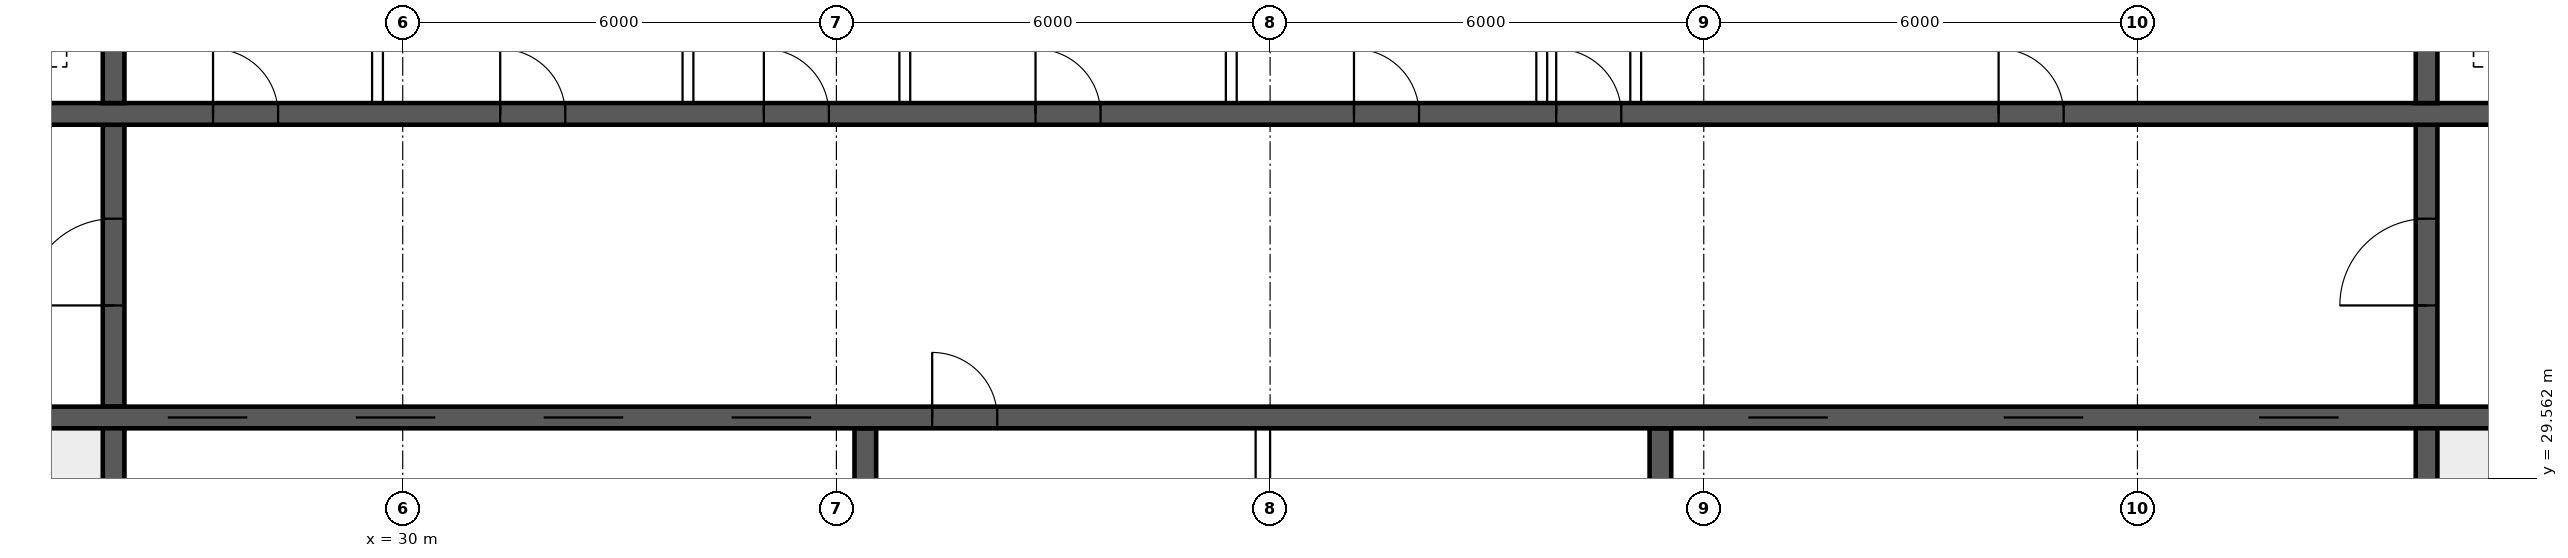
"""IFC4 building model, lengths in metres.
Left out: names, types, materials, properties, quantities, classifications, styles, units other than length and angle.
Written with IfcOpenShell. Run it as: python <this file> out.ifc"""

import sys

from ifc_helpers import new_model, si_unit, direction, frame, frame_2d, origin, place, context, subcontext, project, spatial, rectangle, extrude, element, fill, save


model = new_model("IFC4")
c1 = context("Model", 3, precision=1e-05, world=origin(), true_north=direction((0.0, 1.0)))
c2 = subcontext(c1, "Body", "Model", "MODEL_VIEW")
j1 = project(units=[si_unit("LENGTHUNIT", "METRE"), si_unit("PLANEANGLEUNIT", "RADIAN")], contexts=[c1])
p1 = place(None, origin())
s1 = spatial("IfcSite", under=j1, at=p1, CompositionType="ELEMENT")
p2 = place(p1, origin())
s2 = spatial("IfcBuilding", under=s1, at=p2, CompositionType="ELEMENT")
p3 = place(p2, frame((0.0, 0.0, 182.35)))
s3 = spatial("IfcBuildingStorey", under=s2, at=p3, CompositionType="ELEMENT", Elevation=182.35)
p4 = place(p3, frame((18.425, 30.4, 0.0), z_axis=(0.0, 0.0, 1.0), x_axis=(1.0, 0.0, 0.0)))
e1 = element("IfcWall", 1, at=p4, inside=s3, PredefinedType="SHEAR", context=c2, shape_type="SweptSolid", body=[
    extrude(rectangle(XDim=47.15, YDim=0.3, at=frame_2d((23.575, 0.0))), origin(), (0.0, 0.0, 1.0), 3.75),
])
p5 = place(p4, frame((0.4, 0.0, 0.0)))
e2 = element("IfcOpeningElement", 2, at=p5, cuts=e1, PredefinedType="OPENING", context=c2, shape_type="SweptSolid", body=[
    extrude(rectangle(XDim=1.0, YDim=2.1, at=frame_2d((0.5, 1.05))), frame((0.0, 0.16, 0.0), z_axis=(0.0, -1.0, 0.0), x_axis=(1.0, 0.0, 0.0)), (0.0, 0.0, 1.0), 0.32),
])
p6 = place(p4, frame((45.75, 0.0, 0.0)))
e3 = element("IfcOpeningElement", 3, at=p6, cuts=e1, PredefinedType="OPENING", context=c2, shape_type="SweptSolid", body=[
    extrude(rectangle(XDim=1.0, YDim=2.1, at=frame_2d((0.5, 1.05))), frame((0.0, 0.16, 0.0), z_axis=(0.0, -1.0, 0.0), x_axis=(1.0, 0.0, 0.0)), (0.0, 0.0, 1.0), 0.32),
])
p7 = place(p4, frame((8.325, 0.0, 0.0)))
e4 = element("IfcOpeningElement", 4, at=p7, cuts=e1, PredefinedType="OPENING", context=c2, shape_type="SweptSolid", body=[
    extrude(rectangle(XDim=1.1, YDim=2.1, at=frame_2d((0.55, 1.05))), frame((0.0, 0.16, 0.0), z_axis=(0.0, -1.0, 0.0), x_axis=(1.0, 0.0, 0.0)), (0.0, 0.0, 1.0), 0.32),
])
p8 = place(p4, frame((10.925, 0.0, 0.0)))
e5 = element("IfcOpeningElement", 5, at=p8, cuts=e1, PredefinedType="OPENING", context=c2, shape_type="SweptSolid", body=[
    extrude(rectangle(XDim=1.1, YDim=2.1, at=frame_2d((0.55, 1.05))), frame((0.0, 0.16, 0.0), z_axis=(0.0, -1.0, 0.0), x_axis=(1.0, 0.0, 0.0)), (0.0, 0.0, 1.0), 0.32),
])
p9 = place(p4, frame((13.525, 0.0, 0.0)))
e6 = element("IfcOpeningElement", 6, at=p9, cuts=e1, PredefinedType="OPENING", context=c2, shape_type="SweptSolid", body=[
    extrude(rectangle(XDim=1.1, YDim=2.1, at=frame_2d((0.55, 1.05))), frame((0.0, 0.16, 0.0), z_axis=(0.0, -1.0, 0.0), x_axis=(1.0, 0.0, 0.0)), (0.0, 0.0, 1.0), 0.32),
])
p10 = place(p4, frame((16.125, 0.0, 0.0)))
e7 = element("IfcOpeningElement", 7, at=p10, cuts=e1, PredefinedType="OPENING", context=c2, shape_type="SweptSolid", body=[
    extrude(rectangle(XDim=1.1, YDim=2.1, at=frame_2d((0.55, 1.05))), frame((0.0, 0.16, 0.0), z_axis=(0.0, -1.0, 0.0), x_axis=(1.0, 0.0, 0.0)), (0.0, 0.0, 1.0), 0.32),
])
p11 = place(p4, frame((18.9, 0.0, 0.0)))
e8 = element("IfcOpeningElement", 8, at=p11, cuts=e1, PredefinedType="OPENING", context=c2, shape_type="SweptSolid", body=[
    extrude(rectangle(XDim=0.9, YDim=2.1, at=frame_2d((0.45, 1.05))), frame((0.0, 0.16, 0.0), z_axis=(0.0, -1.0, 0.0), x_axis=(1.0, 0.0, 0.0)), (0.0, 0.0, 1.0), 0.32),
])
p12 = place(p4, frame((30.192, 0.0, 0.0)))
e9 = element("IfcOpeningElement", 9, at=p12, cuts=e1, PredefinedType="OPENING", context=c2, shape_type="SweptSolid", body=[
    extrude(rectangle(XDim=1.1, YDim=2.1, at=frame_2d((0.55, 1.05))), frame((0.0, 0.16, 0.0), z_axis=(0.0, -1.0, 0.0), x_axis=(1.0, 0.0, 0.0)), (0.0, 0.0, 1.0), 0.32),
])
p13 = place(p4, frame((33.725, 0.0, 0.0)))
e10 = element("IfcOpeningElement", 10, at=p13, cuts=e1, PredefinedType="OPENING", context=c2, shape_type="SweptSolid", body=[
    extrude(rectangle(XDim=1.1, YDim=2.1, at=frame_2d((0.55, 1.05))), frame((0.0, 0.16, 0.0), z_axis=(0.0, -1.0, 0.0), x_axis=(1.0, 0.0, 0.0)), (0.0, 0.0, 1.0), 0.32),
])
p14 = place(p4, frame((37.258, 0.0, 0.0)))
e11 = element("IfcOpeningElement", 11, at=p14, cuts=e1, PredefinedType="OPENING", context=c2, shape_type="SweptSolid", body=[
    extrude(rectangle(XDim=1.1, YDim=2.1, at=frame_2d((0.55, 1.05))), frame((0.0, 0.16, 0.0), z_axis=(0.0, -1.0, 0.0), x_axis=(1.0, 0.0, 0.0)), (0.0, 0.0, 1.0), 0.32),
])
p15 = place(p3, frame((18.425, 34.6, 0.0), z_axis=(0.0, 0.0, 1.0), x_axis=(1.0, 0.0, 0.0)))
e12 = element("IfcWall", 12, at=p15, inside=s3, PredefinedType="SHEAR", context=c2, shape_type="SweptSolid", body=[
    extrude(rectangle(XDim=47.15, YDim=0.3, at=frame_2d((23.575, 0.0))), origin(), (0.0, 0.0, 1.0), 3.75),
])
p16 = place(p15, frame((0.9, 0.0, 0.0)))
e13 = element("IfcOpeningElement", 13, at=p16, cuts=e12, PredefinedType="OPENING", context=c2, shape_type="SweptSolid", body=[
    extrude(rectangle(XDim=1.1, YDim=2.1, at=frame_2d((0.55, 1.05))), frame((0.0, 0.16, 0.0), z_axis=(0.0, -1.0, 0.0), x_axis=(1.0, 0.0, 0.0)), (0.0, 0.0, 1.0), 0.32),
])
p17 = place(p15, frame((45.15, 0.0, 0.0)))
e14 = element("IfcOpeningElement", 14, at=p17, cuts=e12, PredefinedType="OPENING", context=c2, shape_type="SweptSolid", body=[
    extrude(rectangle(XDim=1.1, YDim=2.1, at=frame_2d((0.55, 1.05))), frame((0.0, 0.16, 0.0), z_axis=(0.0, -1.0, 0.0), x_axis=(1.0, 0.0, 0.0)), (0.0, 0.0, 1.0), 0.32),
])
p18 = place(p15, frame((4.175, 0.0, 0.0)))
e15 = element("IfcOpeningElement", 15, at=p18, cuts=e12, PredefinedType="OPENING", context=c2, shape_type="SweptSolid", body=[
    extrude(rectangle(XDim=0.9, YDim=2.1, at=frame_2d((0.45, 1.05))), frame((0.0, 0.16, 0.0), z_axis=(0.0, -1.0, 0.0), x_axis=(1.0, 0.0, 0.0)), (0.0, 0.0, 1.0), 0.32),
])
p19 = place(p15, frame((42.075, 0.0, 0.0)))
e16 = element("IfcOpeningElement", 16, at=p19, cuts=e12, PredefinedType="OPENING", context=c2, shape_type="SweptSolid", body=[
    extrude(rectangle(XDim=0.9, YDim=2.1, at=frame_2d((0.45, 1.05))), frame((0.0, 0.16, 0.0), z_axis=(0.0, -1.0, 0.0), x_axis=(1.0, 0.0, 0.0)), (0.0, 0.0, 1.0), 0.32),
])
p20 = place(p15, frame((8.95, 0.0, 0.0)))
e17 = element("IfcOpeningElement", 17, at=p20, cuts=e12, PredefinedType="OPENING", context=c2, shape_type="SweptSolid", body=[
    extrude(rectangle(XDim=0.9, YDim=2.1, at=frame_2d((0.45, 1.05))), frame((0.0, 0.16, 0.0), z_axis=(0.0, -1.0, 0.0), x_axis=(1.0, 0.0, 0.0)), (0.0, 0.0, 1.0), 0.32),
])
p21 = place(p15, frame((12.924, 0.0, 0.0)))
e18 = element("IfcOpeningElement", 18, at=p21, cuts=e12, PredefinedType="OPENING", context=c2, shape_type="SweptSolid", body=[
    extrude(rectangle(XDim=0.9, YDim=2.1, at=frame_2d((0.45, 1.05))), frame((0.0, 0.16, 0.0), z_axis=(0.0, -1.0, 0.0), x_axis=(1.0, 0.0, 0.0)), (0.0, 0.0, 1.0), 0.32),
])
p22 = place(p15, frame((16.571, 0.0, 0.0)))
e19 = element("IfcOpeningElement", 19, at=p22, cuts=e12, PredefinedType="OPENING", context=c2, shape_type="SweptSolid", body=[
    extrude(rectangle(XDim=0.9, YDim=2.1, at=frame_2d((0.45, 1.05))), frame((0.0, 0.16, 0.0), z_axis=(0.0, -1.0, 0.0), x_axis=(1.0, 0.0, 0.0)), (0.0, 0.0, 1.0), 0.32),
])
p23 = place(p15, frame((20.33, 0.0, 0.0)))
e20 = element("IfcOpeningElement", 20, at=p23, cuts=e12, PredefinedType="OPENING", context=c2, shape_type="SweptSolid", body=[
    extrude(rectangle(XDim=0.9, YDim=2.1, at=frame_2d((0.45, 1.05))), frame((0.0, 0.16, 0.0), z_axis=(0.0, -1.0, 0.0), x_axis=(1.0, 0.0, 0.0)), (0.0, 0.0, 1.0), 0.32),
])
p24 = place(p15, frame((24.736, 0.0, 0.0)))
e21 = element("IfcOpeningElement", 21, at=p24, cuts=e12, PredefinedType="OPENING", context=c2, shape_type="SweptSolid", body=[
    extrude(rectangle(XDim=0.9, YDim=2.1, at=frame_2d((0.45, 1.05))), frame((0.0, 0.16, 0.0), z_axis=(0.0, -1.0, 0.0), x_axis=(1.0, 0.0, 0.0)), (0.0, 0.0, 1.0), 0.32),
])
p25 = place(p15, frame((27.533, 0.0, 0.0)))
e22 = element("IfcOpeningElement", 22, at=p25, cuts=e12, PredefinedType="OPENING", context=c2, shape_type="SweptSolid", body=[
    extrude(rectangle(XDim=0.9, YDim=2.1, at=frame_2d((0.45, 1.05))), frame((0.0, 0.16, 0.0), z_axis=(0.0, -1.0, 0.0), x_axis=(1.0, 0.0, 0.0)), (0.0, 0.0, 1.0), 0.32),
])
p26 = place(p15, frame((33.654, 0.0, 0.0)))
e23 = element("IfcOpeningElement", 23, at=p26, cuts=e12, PredefinedType="OPENING", context=c2, shape_type="SweptSolid", body=[
    extrude(rectangle(XDim=0.9, YDim=2.1, at=frame_2d((0.45, 1.05))), frame((0.0, 0.16, 0.0), z_axis=(0.0, -1.0, 0.0), x_axis=(1.0, 0.0, 0.0)), (0.0, 0.0, 1.0), 0.32),
])
for number, where, z_axis, x_axis in (
    (24, (26.0, 26.225, 0.0), (0.0, 0.0, 1.0), (0.0, 1.0, 0.0)),
    (25, (58.0, 26.225, 0.0), (0.0, 0.0, 1.0), (0.0, 1.0, 0.0)),
):
    element("IfcWall", number, at=place(p3, frame(where, z_axis=z_axis, x_axis=x_axis)), inside=s3, PredefinedType="SHEAR", context=c2, shape_type="SweptSolid", body=[
        extrude(rectangle(XDim=4.025, YDim=0.3, at=frame_2d((2.012, 0.0))), origin(), (0.0, 0.0, 1.0), 3.75),
    ])
p27 = place(p3, frame((26.0, 30.55, 0.0), z_axis=(0.0, 0.0, 1.0), x_axis=(0.0, 1.0, 0.0)))
e26 = element("IfcWall", 26, at=p27, inside=s3, PredefinedType="SHEAR", context=c2, shape_type="SweptSolid", body=[
    extrude(rectangle(XDim=3.9, YDim=0.3, at=frame_2d((1.95, 0.0))), origin(), (0.0, 0.0, 1.0), 3.75),
])
p28 = place(p27, frame((1.4, 0.0, 0.0)))
e27 = element("IfcOpeningElement", 27, at=p28, cuts=e26, PredefinedType="OPENING", context=c2, shape_type="SweptSolid", body=[
    extrude(rectangle(XDim=1.2, YDim=2.1, at=frame_2d((0.6, 1.05))), frame((0.0, 0.16, 0.0), z_axis=(0.0, -1.0, 0.0), x_axis=(1.0, 0.0, 0.0)), (0.0, 0.0, 1.0), 0.32),
])
p29 = place(p3, frame((58.0, 30.55, 0.0), z_axis=(0.0, 0.0, 1.0), x_axis=(0.0, 1.0, 0.0)))
e28 = element("IfcWall", 28, at=p29, inside=s3, PredefinedType="SHEAR", context=c2, shape_type="SweptSolid", body=[
    extrude(rectangle(XDim=3.9, YDim=0.3, at=frame_2d((1.95, 0.0))), origin(), (0.0, 0.0, 1.0), 3.75),
])
p30 = place(p29, frame((1.4, 0.0, 0.0)))
e29 = element("IfcOpeningElement", 29, at=p30, cuts=e28, PredefinedType="OPENING", context=c2, shape_type="SweptSolid", body=[
    extrude(rectangle(XDim=1.2, YDim=2.1, at=frame_2d((0.6, 1.05))), frame((0.0, 0.16, 0.0), z_axis=(0.0, -1.0, 0.0), x_axis=(1.0, 0.0, 0.0)), (0.0, 0.0, 1.0), 0.32),
])
for number, where, z_axis, x_axis in (
    (30, (26.0, 34.75, 0.0), (0.0, 0.0, 1.0), (0.0, 1.0, 0.0)),
    (31, (58.0, 34.75, 0.0), (0.0, 0.0, 1.0), (0.0, 1.0, 0.0)),
):
    element("IfcWall", number, at=place(p3, frame(where, z_axis=z_axis, x_axis=x_axis)), inside=s3, PredefinedType="SHEAR", context=c2, shape_type="SweptSolid", body=[
        extrude(rectangle(XDim=3.025, YDim=0.3, at=frame_2d((1.512, 0.0))), origin(), (0.0, 0.0, 1.0), 3.75),
    ])
for number, where, z_axis, x_axis in (
    (32, (36.4, 26.225, 0.0), (0.0, 0.0, 1.0), (0.0, 1.0, 0.0)),
    (33, (47.4, 26.225, 0.0), (0.0, 0.0, 1.0), (0.0, 1.0, 0.0)),
):
    element("IfcWall", number, at=place(p3, frame(where, z_axis=z_axis, x_axis=x_axis)), inside=s3, PredefinedType="SHEAR", context=c2, shape_type="SweptSolid", body=[
        extrude(rectangle(XDim=4.025, YDim=0.3, at=frame_2d((2.012, 0.0))), origin(), (0.0, 0.0, 1.0), 3.75),
    ])
for number, where, z_axis, x_axis in (
    (34, (29.651, 34.75, 0.0), (0.0, 0.0, 1.0), (0.0, 1.0, 0.0)),
    (35, (33.946, 34.75, 0.0), (0.0, 0.0, 1.0), (0.0, 1.0, 0.0)),
    (36, (36.946, 34.75, 0.0), (0.0, 0.0, 1.0), (0.0, 1.0, 0.0)),
    (37, (41.463, 34.75, 0.0), (0.0, 0.0, 1.0), (0.0, 1.0, 0.0)),
    (38, (45.758, 34.75, 0.0), (0.0, 0.0, 1.0), (0.0, 1.0, 0.0)),
    (39, (47.058, 34.75, 0.0), (0.0, 0.0, 1.0), (0.0, 1.0, 0.0)),
):
    element("IfcWall", number, at=place(p3, frame(where, z_axis=z_axis, x_axis=x_axis)), inside=s3, PredefinedType="SOLIDWALL", context=c2, shape_type="SweptSolid", body=[
        extrude(rectangle(XDim=3.025, YDim=0.15, at=frame_2d((1.512, 0.0))), origin(), (0.0, 0.0, 1.0), 3.5),
    ])
p31 = place(p3, frame((41.9, 26.225, 0.0), z_axis=(0.0, 0.0, 1.0), x_axis=(0.0, 1.0, 0.0)))
e40 = element("IfcWall", 40, at=p31, inside=s3, PredefinedType="SOLIDWALL", context=c2, shape_type="SweptSolid", body=[
    extrude(rectangle(XDim=4.025, YDim=0.2, at=frame_2d((2.012, 0.0))), origin(), (0.0, 0.0, 1.0), 3.5),
])
p32 = place(p28, origin())
e41 = element("IfcDoor", 41, at=p32, inside=s3, OperationType="SINGLE_SWING_LEFT", PredefinedType="DOOR", context=c2, shape_type="SweptSolid", body=[
    extrude(rectangle(XDim=1.2, YDim=2.1, at=frame_2d((0.6, 1.05))), frame((0.0, 0.025, 0.0), z_axis=(0.0, -1.0, 0.0), x_axis=(1.0, 0.0, 0.0)), (0.0, 0.0, 1.0), 0.05),
])
fill(e27, e41)
p33 = place(p30, origin())
e42 = element("IfcDoor", 42, at=p33, inside=s3, OperationType="SINGLE_SWING_LEFT", PredefinedType="DOOR", context=c2, shape_type="SweptSolid", body=[
    extrude(rectangle(XDim=1.2, YDim=2.1, at=frame_2d((0.6, 1.05))), frame((0.0, 0.025, 0.0), z_axis=(0.0, -1.0, 0.0), x_axis=(1.0, 0.0, 0.0)), (0.0, 0.0, 1.0), 0.05),
])
fill(e29, e42)
p34 = place(p20, origin())
e43 = element("IfcDoor", 43, at=p34, inside=s3, OperationType="SINGLE_SWING_LEFT", PredefinedType="DOOR", context=c2, shape_type="SweptSolid", body=[
    extrude(rectangle(XDim=0.9, YDim=2.1, at=frame_2d((0.45, 1.05))), frame((0.0, 0.025, 0.0), z_axis=(0.0, -1.0, 0.0), x_axis=(1.0, 0.0, 0.0)), (0.0, 0.0, 1.0), 0.05),
])
fill(e17, e43)
p35 = place(p21, origin())
e44 = element("IfcDoor", 44, at=p35, inside=s3, OperationType="SINGLE_SWING_LEFT", PredefinedType="DOOR", context=c2, shape_type="SweptSolid", body=[
    extrude(rectangle(XDim=0.9, YDim=2.1, at=frame_2d((0.45, 1.05))), frame((0.0, 0.025, 0.0), z_axis=(0.0, -1.0, 0.0), x_axis=(1.0, 0.0, 0.0)), (0.0, 0.0, 1.0), 0.05),
])
fill(e18, e44)
p36 = place(p22, origin())
e45 = element("IfcDoor", 45, at=p36, inside=s3, OperationType="SINGLE_SWING_LEFT", PredefinedType="DOOR", context=c2, shape_type="SweptSolid", body=[
    extrude(rectangle(XDim=0.9, YDim=2.1, at=frame_2d((0.45, 1.05))), frame((0.0, 0.025, 0.0), z_axis=(0.0, -1.0, 0.0), x_axis=(1.0, 0.0, 0.0)), (0.0, 0.0, 1.0), 0.05),
])
fill(e19, e45)
p37 = place(p23, origin())
e46 = element("IfcDoor", 46, at=p37, inside=s3, OperationType="SINGLE_SWING_LEFT", PredefinedType="DOOR", context=c2, shape_type="SweptSolid", body=[
    extrude(rectangle(XDim=0.9, YDim=2.1, at=frame_2d((0.45, 1.05))), frame((0.0, 0.025, 0.0), z_axis=(0.0, -1.0, 0.0), x_axis=(1.0, 0.0, 0.0)), (0.0, 0.0, 1.0), 0.05),
])
fill(e20, e46)
p38 = place(p24, origin())
e47 = element("IfcDoor", 47, at=p38, inside=s3, OperationType="SINGLE_SWING_LEFT", PredefinedType="DOOR", context=c2, shape_type="SweptSolid", body=[
    extrude(rectangle(XDim=0.9, YDim=2.1, at=frame_2d((0.45, 1.05))), frame((0.0, 0.025, 0.0), z_axis=(0.0, -1.0, 0.0), x_axis=(1.0, 0.0, 0.0)), (0.0, 0.0, 1.0), 0.05),
])
fill(e21, e47)
p39 = place(p25, origin())
e48 = element("IfcDoor", 48, at=p39, inside=s3, OperationType="SINGLE_SWING_LEFT", PredefinedType="DOOR", context=c2, shape_type="SweptSolid", body=[
    extrude(rectangle(XDim=0.9, YDim=2.1, at=frame_2d((0.45, 1.05))), frame((0.0, 0.025, 0.0), z_axis=(0.0, -1.0, 0.0), x_axis=(1.0, 0.0, 0.0)), (0.0, 0.0, 1.0), 0.05),
])
fill(e22, e48)
p40 = place(p26, origin())
e49 = element("IfcDoor", 49, at=p40, inside=s3, OperationType="SINGLE_SWING_LEFT", PredefinedType="DOOR", context=c2, shape_type="SweptSolid", body=[
    extrude(rectangle(XDim=0.9, YDim=2.1, at=frame_2d((0.45, 1.05))), frame((0.0, 0.025, 0.0), z_axis=(0.0, -1.0, 0.0), x_axis=(1.0, 0.0, 0.0)), (0.0, 0.0, 1.0), 0.05),
])
fill(e23, e49)
p41 = place(p7, origin())
e50 = element("IfcDoor", 50, at=p41, inside=s3, OperationType="DOUBLE_DOOR_SLIDING", PredefinedType="DOOR", context=c2, shape_type="SweptSolid", body=[
    extrude(rectangle(XDim=1.1, YDim=2.1, at=frame_2d((0.55, 1.05))), frame((0.0, 0.025, 0.0), z_axis=(0.0, -1.0, 0.0), x_axis=(1.0, 0.0, 0.0)), (0.0, 0.0, 1.0), 0.05),
])
fill(e4, e50)
p42 = place(p8, origin())
e51 = element("IfcDoor", 51, at=p42, inside=s3, OperationType="DOUBLE_DOOR_SLIDING", PredefinedType="DOOR", context=c2, shape_type="SweptSolid", body=[
    extrude(rectangle(XDim=1.1, YDim=2.1, at=frame_2d((0.55, 1.05))), frame((0.0, 0.025, 0.0), z_axis=(0.0, -1.0, 0.0), x_axis=(1.0, 0.0, 0.0)), (0.0, 0.0, 1.0), 0.05),
])
fill(e5, e51)
p43 = place(p9, origin())
e52 = element("IfcDoor", 52, at=p43, inside=s3, OperationType="DOUBLE_DOOR_SLIDING", PredefinedType="DOOR", context=c2, shape_type="SweptSolid", body=[
    extrude(rectangle(XDim=1.1, YDim=2.1, at=frame_2d((0.55, 1.05))), frame((0.0, 0.025, 0.0), z_axis=(0.0, -1.0, 0.0), x_axis=(1.0, 0.0, 0.0)), (0.0, 0.0, 1.0), 0.05),
])
fill(e6, e52)
p44 = place(p10, origin())
e53 = element("IfcDoor", 53, at=p44, inside=s3, OperationType="DOUBLE_DOOR_SLIDING", PredefinedType="DOOR", context=c2, shape_type="SweptSolid", body=[
    extrude(rectangle(XDim=1.1, YDim=2.1, at=frame_2d((0.55, 1.05))), frame((0.0, 0.025, 0.0), z_axis=(0.0, -1.0, 0.0), x_axis=(1.0, 0.0, 0.0)), (0.0, 0.0, 1.0), 0.05),
])
fill(e7, e53)
p45 = place(p11, origin())
e54 = element("IfcDoor", 54, at=p45, inside=s3, OperationType="SINGLE_SWING_LEFT", PredefinedType="DOOR", context=c2, shape_type="SweptSolid", body=[
    extrude(rectangle(XDim=0.9, YDim=2.1, at=frame_2d((0.45, 1.05))), frame((0.0, 0.025, 0.0), z_axis=(0.0, -1.0, 0.0), x_axis=(1.0, 0.0, 0.0)), (0.0, 0.0, 1.0), 0.05),
])
fill(e8, e54)
p46 = place(p12, origin())
e55 = element("IfcDoor", 55, at=p46, inside=s3, OperationType="DOUBLE_DOOR_SLIDING", PredefinedType="DOOR", context=c2, shape_type="SweptSolid", body=[
    extrude(rectangle(XDim=1.1, YDim=2.1, at=frame_2d((0.55, 1.05))), frame((0.0, 0.025, 0.0), z_axis=(0.0, -1.0, 0.0), x_axis=(1.0, 0.0, 0.0)), (0.0, 0.0, 1.0), 0.05),
])
fill(e9, e55)
p47 = place(p13, origin())
e56 = element("IfcDoor", 56, at=p47, inside=s3, OperationType="DOUBLE_DOOR_SLIDING", PredefinedType="DOOR", context=c2, shape_type="SweptSolid", body=[
    extrude(rectangle(XDim=1.1, YDim=2.1, at=frame_2d((0.55, 1.05))), frame((0.0, 0.025, 0.0), z_axis=(0.0, -1.0, 0.0), x_axis=(1.0, 0.0, 0.0)), (0.0, 0.0, 1.0), 0.05),
])
fill(e10, e56)
p48 = place(p14, origin())
e57 = element("IfcDoor", 57, at=p48, inside=s3, OperationType="DOUBLE_DOOR_SLIDING", PredefinedType="DOOR", context=c2, shape_type="SweptSolid", body=[
    extrude(rectangle(XDim=1.1, YDim=2.1, at=frame_2d((0.55, 1.05))), frame((0.0, 0.025, 0.0), z_axis=(0.0, -1.0, 0.0), x_axis=(1.0, 0.0, 0.0)), (0.0, 0.0, 1.0), 0.05),
])
fill(e11, e57)
save(model, sys.argv[1])
